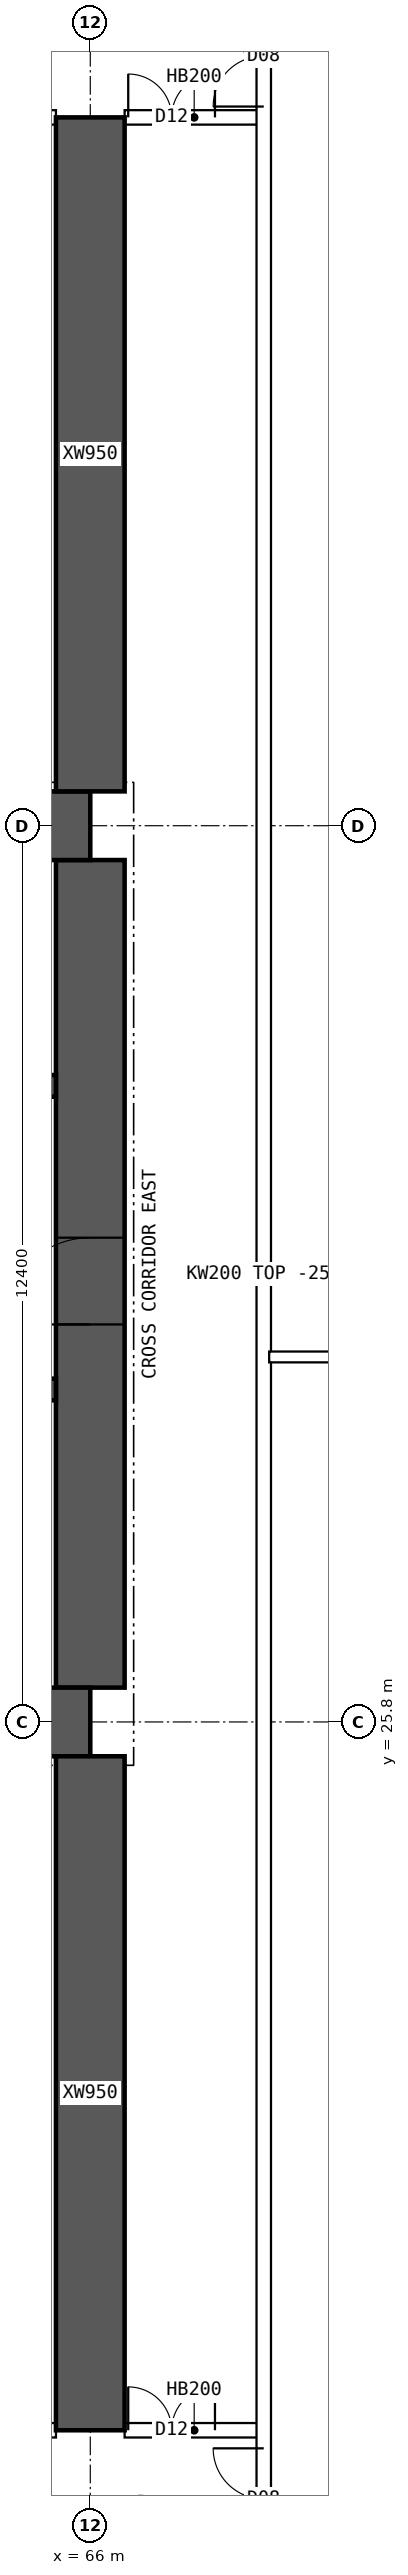
"""IFC4 building model, lengths in metres.
Left out: names, types, materials, properties, quantities, classifications, styles, units other than length and angle.
Written with IfcOpenShell. Run it as: python <this file> out.ifc"""

import sys

from ifc_helpers import new_model, si_unit, direction, frame, frame_2d, origin, place, context, subcontext, project, spatial, polyline, rectangle, outline, extrude, element, fill, save


model = new_model("IFC4")
c1 = context("Model", 3, precision=1e-05, world=origin(), true_north=direction((0.0, 1.0)))
c2 = subcontext(c1, "Body", "Model", "MODEL_VIEW")
j1 = project(units=[si_unit("LENGTHUNIT", "METRE"), si_unit("PLANEANGLEUNIT", "RADIAN")], contexts=[c1])
p1 = place(None, origin())
s1 = spatial("IfcSite", under=j1, at=p1, CompositionType="ELEMENT")
p2 = place(p1, origin())
s2 = spatial("IfcBuilding", under=s1, at=p2, CompositionType="ELEMENT")
p3 = place(p2, frame((0.0, 0.0, 125.65)))
s3 = spatial("IfcBuildingStorey", under=s2, at=p3, CompositionType="ELEMENT", Elevation=125.65)
for number, where, z_axis, x_axis in (
    (1, (18.0, 25.8, 0.0), (0.0, 0.0, 1.0), (1.0, 0.0, 0.0)),
    (2, (18.0, 38.2, 0.0), (0.0, 0.0, 1.0), (1.0, 0.0, 0.0)),
):
    element("IfcWall", number, at=place(p3, frame(where, z_axis=z_axis, x_axis=x_axis)), inside=s3, PredefinedType="SHEAR", context=c2, shape_type="SweptSolid", body=[
        extrude(rectangle(XDim=48.0, YDim=0.95, at=frame_2d((24.0, 0.0))), origin(), (0.0, 0.0, 1.0), 3.75),
    ])
p4 = place(p3, frame((66.0, 26.275, 0.0), z_axis=(0.0, 0.0, 1.0), x_axis=(0.0, 1.0, 0.0)))
e3 = element("IfcWall", 3, at=p4, inside=s3, PredefinedType="SHEAR", context=c2, shape_type="SweptSolid", body=[
    extrude(rectangle(XDim=11.45, YDim=0.95, at=frame_2d((5.725, 0.0))), origin(), (0.0, 0.0, 1.0), 3.75),
])
p5 = place(p4, frame((5.025, 0.0, 0.0)))
e4 = element("IfcOpeningElement", 4, at=p5, cuts=e3, PredefinedType="OPENING", context=c2, shape_type="SweptSolid", body=[
    extrude(rectangle(XDim=1.2, YDim=2.1, at=frame_2d((0.6, 1.05))), frame((0.0, 0.485, 0.0), z_axis=(0.0, -1.0, 0.0), x_axis=(1.0, 0.0, 0.0)), (0.0, 0.0, 1.0), 0.97),
])
p6 = place(p3, frame((18.475, 30.4, 0.0), z_axis=(0.0, 0.0, 1.0), x_axis=(1.0, 0.0, 0.0)))
e5 = element("IfcWall", 5, at=p6, inside=s3, PredefinedType="SHEAR", context=c2, shape_type="SweptSolid", body=[
    extrude(rectangle(XDim=47.05, YDim=0.3, at=frame_2d((23.525, 0.0))), origin(), (0.0, 0.0, 1.0), 3.75),
])
p7 = place(p6, frame((0.4, 0.0, 0.0)))
e6 = element("IfcOpeningElement", 6, at=p7, cuts=e5, PredefinedType="OPENING", context=c2, shape_type="SweptSolid", body=[
    extrude(rectangle(XDim=1.0, YDim=2.1, at=frame_2d((0.5, 1.05))), frame((0.0, 0.16, 0.0), z_axis=(0.0, -1.0, 0.0), x_axis=(1.0, 0.0, 0.0)), (0.0, 0.0, 1.0), 0.32),
])
p8 = place(p6, frame((45.65, 0.0, 0.0)))
e7 = element("IfcOpeningElement", 7, at=p8, cuts=e5, PredefinedType="OPENING", context=c2, shape_type="SweptSolid", body=[
    extrude(rectangle(XDim=1.0, YDim=2.1, at=frame_2d((0.5, 1.05))), frame((0.0, 0.16, 0.0), z_axis=(0.0, -1.0, 0.0), x_axis=(1.0, 0.0, 0.0)), (0.0, 0.0, 1.0), 0.32),
])
p9 = place(p6, frame((8.275, 0.0, 0.0)))
e8 = element("IfcOpeningElement", 8, at=p9, cuts=e5, PredefinedType="OPENING", context=c2, shape_type="SweptSolid", body=[
    extrude(rectangle(XDim=1.1, YDim=2.1, at=frame_2d((0.55, 1.05))), frame((0.0, 0.16, 0.0), z_axis=(0.0, -1.0, 0.0), x_axis=(1.0, 0.0, 0.0)), (0.0, 0.0, 1.0), 0.32),
])
p10 = place(p6, frame((10.875, 0.0, 0.0)))
e9 = element("IfcOpeningElement", 9, at=p10, cuts=e5, PredefinedType="OPENING", context=c2, shape_type="SweptSolid", body=[
    extrude(rectangle(XDim=1.1, YDim=2.1, at=frame_2d((0.55, 1.05))), frame((0.0, 0.16, 0.0), z_axis=(0.0, -1.0, 0.0), x_axis=(1.0, 0.0, 0.0)), (0.0, 0.0, 1.0), 0.32),
])
p11 = place(p6, frame((13.475, 0.0, 0.0)))
e10 = element("IfcOpeningElement", 10, at=p11, cuts=e5, PredefinedType="OPENING", context=c2, shape_type="SweptSolid", body=[
    extrude(rectangle(XDim=1.1, YDim=2.1, at=frame_2d((0.55, 1.05))), frame((0.0, 0.16, 0.0), z_axis=(0.0, -1.0, 0.0), x_axis=(1.0, 0.0, 0.0)), (0.0, 0.0, 1.0), 0.32),
])
p12 = place(p6, frame((16.075, 0.0, 0.0)))
e11 = element("IfcOpeningElement", 11, at=p12, cuts=e5, PredefinedType="OPENING", context=c2, shape_type="SweptSolid", body=[
    extrude(rectangle(XDim=1.1, YDim=2.1, at=frame_2d((0.55, 1.05))), frame((0.0, 0.16, 0.0), z_axis=(0.0, -1.0, 0.0), x_axis=(1.0, 0.0, 0.0)), (0.0, 0.0, 1.0), 0.32),
])
p13 = place(p6, frame((18.85, 0.0, 0.0)))
e12 = element("IfcOpeningElement", 12, at=p13, cuts=e5, PredefinedType="OPENING", context=c2, shape_type="SweptSolid", body=[
    extrude(rectangle(XDim=0.9, YDim=2.1, at=frame_2d((0.45, 1.05))), frame((0.0, 0.16, 0.0), z_axis=(0.0, -1.0, 0.0), x_axis=(1.0, 0.0, 0.0)), (0.0, 0.0, 1.0), 0.32),
])
p14 = place(p6, frame((30.142, 0.0, 0.0)))
e13 = element("IfcOpeningElement", 13, at=p14, cuts=e5, PredefinedType="OPENING", context=c2, shape_type="SweptSolid", body=[
    extrude(rectangle(XDim=1.1, YDim=2.1, at=frame_2d((0.55, 1.05))), frame((0.0, 0.16, 0.0), z_axis=(0.0, -1.0, 0.0), x_axis=(1.0, 0.0, 0.0)), (0.0, 0.0, 1.0), 0.32),
])
p15 = place(p6, frame((33.675, 0.0, 0.0)))
e14 = element("IfcOpeningElement", 14, at=p15, cuts=e5, PredefinedType="OPENING", context=c2, shape_type="SweptSolid", body=[
    extrude(rectangle(XDim=1.1, YDim=2.1, at=frame_2d((0.55, 1.05))), frame((0.0, 0.16, 0.0), z_axis=(0.0, -1.0, 0.0), x_axis=(1.0, 0.0, 0.0)), (0.0, 0.0, 1.0), 0.32),
])
p16 = place(p6, frame((37.208, 0.0, 0.0)))
e15 = element("IfcOpeningElement", 15, at=p16, cuts=e5, PredefinedType="OPENING", context=c2, shape_type="SweptSolid", body=[
    extrude(rectangle(XDim=1.1, YDim=2.1, at=frame_2d((0.55, 1.05))), frame((0.0, 0.16, 0.0), z_axis=(0.0, -1.0, 0.0), x_axis=(1.0, 0.0, 0.0)), (0.0, 0.0, 1.0), 0.32),
])
p17 = place(p3, frame((18.475, 34.6, 0.0), z_axis=(0.0, 0.0, 1.0), x_axis=(1.0, 0.0, 0.0)))
e16 = element("IfcWall", 16, at=p17, inside=s3, PredefinedType="SHEAR", context=c2, shape_type="SweptSolid", body=[
    extrude(rectangle(XDim=47.05, YDim=0.3, at=frame_2d((23.525, 0.0))), origin(), (0.0, 0.0, 1.0), 3.75),
])
p18 = place(p17, frame((0.9, 0.0, 0.0)))
e17 = element("IfcOpeningElement", 17, at=p18, cuts=e16, PredefinedType="OPENING", context=c2, shape_type="SweptSolid", body=[
    extrude(rectangle(XDim=1.1, YDim=2.1, at=frame_2d((0.55, 1.05))), frame((0.0, 0.16, 0.0), z_axis=(0.0, -1.0, 0.0), x_axis=(1.0, 0.0, 0.0)), (0.0, 0.0, 1.0), 0.32),
])
p19 = place(p17, frame((45.05, 0.0, 0.0)))
e18 = element("IfcOpeningElement", 18, at=p19, cuts=e16, PredefinedType="OPENING", context=c2, shape_type="SweptSolid", body=[
    extrude(rectangle(XDim=1.1, YDim=2.1, at=frame_2d((0.55, 1.05))), frame((0.0, 0.16, 0.0), z_axis=(0.0, -1.0, 0.0), x_axis=(1.0, 0.0, 0.0)), (0.0, 0.0, 1.0), 0.32),
])
p20 = place(p17, frame((4.125, 0.0, 0.0)))
e19 = element("IfcOpeningElement", 19, at=p20, cuts=e16, PredefinedType="OPENING", context=c2, shape_type="SweptSolid", body=[
    extrude(rectangle(XDim=0.9, YDim=2.1, at=frame_2d((0.45, 1.05))), frame((0.0, 0.16, 0.0), z_axis=(0.0, -1.0, 0.0), x_axis=(1.0, 0.0, 0.0)), (0.0, 0.0, 1.0), 0.32),
])
p21 = place(p17, frame((42.025, 0.0, 0.0)))
e20 = element("IfcOpeningElement", 20, at=p21, cuts=e16, PredefinedType="OPENING", context=c2, shape_type="SweptSolid", body=[
    extrude(rectangle(XDim=0.9, YDim=2.1, at=frame_2d((0.45, 1.05))), frame((0.0, 0.16, 0.0), z_axis=(0.0, -1.0, 0.0), x_axis=(1.0, 0.0, 0.0)), (0.0, 0.0, 1.0), 0.32),
])
p22 = place(p17, frame((8.9, 0.0, 0.0)))
e21 = element("IfcOpeningElement", 21, at=p22, cuts=e16, PredefinedType="OPENING", context=c2, shape_type="SweptSolid", body=[
    extrude(rectangle(XDim=0.9, YDim=2.1, at=frame_2d((0.45, 1.05))), frame((0.0, 0.16, 0.0), z_axis=(0.0, -1.0, 0.0), x_axis=(1.0, 0.0, 0.0)), (0.0, 0.0, 1.0), 0.32),
])
p23 = place(p17, frame((12.874, 0.0, 0.0)))
e22 = element("IfcOpeningElement", 22, at=p23, cuts=e16, PredefinedType="OPENING", context=c2, shape_type="SweptSolid", body=[
    extrude(rectangle(XDim=0.9, YDim=2.1, at=frame_2d((0.45, 1.05))), frame((0.0, 0.16, 0.0), z_axis=(0.0, -1.0, 0.0), x_axis=(1.0, 0.0, 0.0)), (0.0, 0.0, 1.0), 0.32),
])
p24 = place(p17, frame((16.521, 0.0, 0.0)))
e23 = element("IfcOpeningElement", 23, at=p24, cuts=e16, PredefinedType="OPENING", context=c2, shape_type="SweptSolid", body=[
    extrude(rectangle(XDim=0.9, YDim=2.1, at=frame_2d((0.45, 1.05))), frame((0.0, 0.16, 0.0), z_axis=(0.0, -1.0, 0.0), x_axis=(1.0, 0.0, 0.0)), (0.0, 0.0, 1.0), 0.32),
])
p25 = place(p17, frame((20.28, 0.0, 0.0)))
e24 = element("IfcOpeningElement", 24, at=p25, cuts=e16, PredefinedType="OPENING", context=c2, shape_type="SweptSolid", body=[
    extrude(rectangle(XDim=0.9, YDim=2.1, at=frame_2d((0.45, 1.05))), frame((0.0, 0.16, 0.0), z_axis=(0.0, -1.0, 0.0), x_axis=(1.0, 0.0, 0.0)), (0.0, 0.0, 1.0), 0.32),
])
p26 = place(p17, frame((24.686, 0.0, 0.0)))
e25 = element("IfcOpeningElement", 25, at=p26, cuts=e16, PredefinedType="OPENING", context=c2, shape_type="SweptSolid", body=[
    extrude(rectangle(XDim=0.9, YDim=2.1, at=frame_2d((0.45, 1.05))), frame((0.0, 0.16, 0.0), z_axis=(0.0, -1.0, 0.0), x_axis=(1.0, 0.0, 0.0)), (0.0, 0.0, 1.0), 0.32),
])
p27 = place(p17, frame((27.483, 0.0, 0.0)))
e26 = element("IfcOpeningElement", 26, at=p27, cuts=e16, PredefinedType="OPENING", context=c2, shape_type="SweptSolid", body=[
    extrude(rectangle(XDim=0.9, YDim=2.1, at=frame_2d((0.45, 1.05))), frame((0.0, 0.16, 0.0), z_axis=(0.0, -1.0, 0.0), x_axis=(1.0, 0.0, 0.0)), (0.0, 0.0, 1.0), 0.32),
])
p28 = place(p17, frame((29.45, 0.0, 0.0)))
e27 = element("IfcOpeningElement", 27, at=p28, cuts=e16, PredefinedType="OPENING", context=c2, shape_type="SweptSolid", body=[
    extrude(rectangle(XDim=0.9, YDim=2.1, at=frame_2d((0.45, 1.05))), frame((0.0, 0.16, 0.0), z_axis=(0.0, -1.0, 0.0), x_axis=(1.0, 0.0, 0.0)), (0.0, 0.0, 1.0), 0.32),
])
p29 = place(p17, frame((31.882, 0.0, 0.0)))
e28 = element("IfcOpeningElement", 28, at=p29, cuts=e16, PredefinedType="OPENING", context=c2, shape_type="SweptSolid", body=[
    extrude(rectangle(XDim=0.9, YDim=2.1, at=frame_2d((0.45, 1.05))), frame((0.0, 0.16, 0.0), z_axis=(0.0, -1.0, 0.0), x_axis=(1.0, 0.0, 0.0)), (0.0, 0.0, 1.0), 0.32),
])
p30 = place(p17, frame((34.617, 0.0, 0.0)))
e29 = element("IfcOpeningElement", 29, at=p30, cuts=e16, PredefinedType="OPENING", context=c2, shape_type="SweptSolid", body=[
    extrude(rectangle(XDim=0.9, YDim=2.1, at=frame_2d((0.45, 1.05))), frame((0.0, 0.16, 0.0), z_axis=(0.0, -1.0, 0.0), x_axis=(1.0, 0.0, 0.0)), (0.0, 0.0, 1.0), 0.32),
])
p31 = place(p17, frame((37.656, 0.0, 0.0)))
e30 = element("IfcOpeningElement", 30, at=p31, cuts=e16, PredefinedType="OPENING", context=c2, shape_type="SweptSolid", body=[
    extrude(rectangle(XDim=0.9, YDim=2.1, at=frame_2d((0.45, 1.05))), frame((0.0, 0.16, 0.0), z_axis=(0.0, -1.0, 0.0), x_axis=(1.0, 0.0, 0.0)), (0.0, 0.0, 1.0), 0.32),
])
for number, where, z_axis, x_axis in (
    (31, (66.0, 16.0, 0.0), (0.0, 0.0, 1.0), (0.0, 1.0, 0.0)),
    (32, (66.0, 38.675, 0.0), (0.0, 0.0, 1.0), (0.0, 1.0, 0.0)),
):
    element("IfcWall", number, at=place(p3, frame(where, z_axis=z_axis, x_axis=x_axis)), inside=s3, PredefinedType="SHEAR", context=c2, shape_type="SweptSolid", body=[
        extrude(rectangle(XDim=9.325, YDim=0.95, at=frame_2d((4.663, 0.0))), origin(), (0.0, 0.0, 1.0), 3.75),
    ])
p32 = place(p3, frame((60.475, 16.0, 0.0), z_axis=(0.0, 0.0, 1.0), x_axis=(1.0, 0.0, 0.0)))
e33 = element("IfcWall", 33, at=p32, inside=s3, PredefinedType="SOLIDWALL", context=c2, shape_type="SweptSolid", body=[
    extrude(rectangle(XDim=5.05, YDim=0.2, at=frame_2d((2.525, 0.0))), origin(), (0.0, 0.0, 1.0), 3.5),
])
p33 = place(p32, frame((0.15, 0.0, 0.0)))
e34 = element("IfcOpeningElement", 34, at=p33, cuts=e33, PredefinedType="OPENING", context=c2, shape_type="SweptSolid", body=[
    extrude(rectangle(XDim=0.9, YDim=2.1, at=frame_2d((0.45, 1.05))), frame((0.0, 0.11, 0.0), z_axis=(0.0, -1.0, 0.0), x_axis=(1.0, 0.0, 0.0)), (0.0, 0.0, 1.0), 0.22),
])
p34 = place(p32, frame((3.535, 0.0, 0.0)))
e35 = element("IfcOpeningElement", 35, at=p34, cuts=e33, PredefinedType="OPENING", context=c2, shape_type="SweptSolid", body=[
    extrude(rectangle(XDim=0.9, YDim=2.1, at=frame_2d((0.45, 1.05))), frame((0.0, 0.11, 0.0), z_axis=(0.0, -1.0, 0.0), x_axis=(1.0, 0.0, 0.0)), (0.0, 0.0, 1.0), 0.22),
])
p35 = place(p3, frame((66.475, 16.0, 0.0), z_axis=(0.0, 0.0, 1.0), x_axis=(1.0, 0.0, 0.0)))
e36 = element("IfcWall", 36, at=p35, inside=s3, PredefinedType="SOLIDWALL", context=c2, shape_type="SweptSolid", body=[
    extrude(rectangle(XDim=1.925, YDim=0.2, at=frame_2d((0.962, 0.0))), origin(), (0.0, 0.0, 1.0), 3.5),
])
p36 = place(p35, frame((0.05, 0.0, 0.0)))
e37 = element("IfcOpeningElement", 37, at=p36, cuts=e36, PredefinedType="OPENING", context=c2, shape_type="SweptSolid", body=[
    extrude(rectangle(XDim=1.2, YDim=2.1, at=frame_2d((0.6, 1.05))), frame((0.0, 0.11, 0.0), z_axis=(0.0, -1.0, 0.0), x_axis=(1.0, 0.0, 0.0)), (0.0, 0.0, 1.0), 0.22),
])
p37 = place(p3, frame((60.475, 48.0, 0.0), z_axis=(0.0, 0.0, 1.0), x_axis=(1.0, 0.0, 0.0)))
e38 = element("IfcWall", 38, at=p37, inside=s3, PredefinedType="SOLIDWALL", context=c2, shape_type="SweptSolid", body=[
    extrude(rectangle(XDim=5.05, YDim=0.2, at=frame_2d((2.525, 0.0))), origin(), (0.0, 0.0, 1.0), 3.5),
])
p38 = place(p37, frame((0.4, 0.0, 0.0)))
e39 = element("IfcOpeningElement", 39, at=p38, cuts=e38, PredefinedType="OPENING", context=c2, shape_type="SweptSolid", body=[
    extrude(rectangle(XDim=1.0, YDim=2.1, at=frame_2d((0.5, 1.05))), frame((0.0, 0.11, 0.0), z_axis=(0.0, -1.0, 0.0), x_axis=(1.0, 0.0, 0.0)), (0.0, 0.0, 1.0), 0.22),
])
p39 = place(p3, frame((66.475, 48.0, 0.0), z_axis=(0.0, 0.0, 1.0), x_axis=(1.0, 0.0, 0.0)))
e40 = element("IfcWall", 40, at=p39, inside=s3, PredefinedType="SOLIDWALL", context=c2, shape_type="SweptSolid", body=[
    extrude(rectangle(XDim=1.925, YDim=0.2, at=frame_2d((0.962, 0.0))), origin(), (0.0, 0.0, 1.0), 3.5),
])
p40 = place(p39, frame((0.05, 0.0, 0.0)))
e41 = element("IfcOpeningElement", 41, at=p40, cuts=e40, PredefinedType="OPENING", context=c2, shape_type="SweptSolid", body=[
    extrude(rectangle(XDim=1.2, YDim=2.1, at=frame_2d((0.6, 1.05))), frame((0.0, 0.11, 0.0), z_axis=(0.0, -1.0, 0.0), x_axis=(1.0, 0.0, 0.0)), (0.0, 0.0, 1.0), 0.22),
])
p41 = place(p3, frame((68.475, 30.85, 0.0), z_axis=(0.0, 0.0, 1.0), x_axis=(1.0, 0.0, 0.0)))
e42 = element("IfcWall", 42, at=p41, inside=s3, PredefinedType="PARTITIONING", context=c2, shape_type="SweptSolid", body=[
    extrude(outline(polyline([(0.0, 0.0), (6.82, 0.0), (6.82, 3.5), (3.827, 3.5), (3.825, 3.05), (3.227, 3.05), (3.225, 3.5), (0.0, 3.5), (0.0, 0.0)])), frame((0.0, 0.075, 0.0), z_axis=(0.0, -1.0, 0.0), x_axis=(1.0, 0.0, 0.0)), (0.0, 0.0, 1.0), 0.15),
])
p42 = place(p3, frame((68.4, 9.405, 0.0), z_axis=(0.0, 0.0, 1.0), x_axis=(0.0, 1.0, 0.0)))
e43 = element("IfcWall", 43, at=p42, inside=s3, PredefinedType="SOLIDWALL", context=c2, shape_type="SweptSolid", body=[
    extrude(rectangle(XDim=45.189, YDim=0.2, at=frame_2d((22.595, 0.0))), origin(), (0.0, 0.0, 1.0), 3.5),
])
p43 = place(p42, frame((4.945, 0.0, 0.0)))
e44 = element("IfcOpeningElement", 44, at=p43, cuts=e43, PredefinedType="OPENING", context=c2, shape_type="SweptSolid", body=[
    extrude(rectangle(XDim=1.4, YDim=2.1, at=frame_2d((0.7, 1.05))), frame((0.0, 0.11, 0.0), z_axis=(0.0, -1.0, 0.0), x_axis=(1.0, 0.0, 0.0)), (0.0, 0.0, 1.0), 0.22),
])
p44 = place(p42, frame((38.745, 0.0, 0.0)))
e45 = element("IfcOpeningElement", 45, at=p44, cuts=e43, PredefinedType="OPENING", context=c2, shape_type="SweptSolid", body=[
    extrude(rectangle(XDim=1.4, YDim=2.1, at=frame_2d((0.7, 1.05))), frame((0.0, 0.11, 0.0), z_axis=(0.0, -1.0, 0.0), x_axis=(1.0, 0.0, 0.0)), (0.0, 0.0, 1.0), 0.22),
])
p45 = place(p5, origin())
e46 = element("IfcDoor", 46, at=p45, inside=s3, OperationType="SINGLE_SWING_LEFT", PredefinedType="DOOR", context=c2, shape_type="SweptSolid", body=[
    extrude(rectangle(XDim=1.2, YDim=2.1, at=frame_2d((0.6, 1.05))), frame((0.0, 0.025, 0.0), z_axis=(0.0, -1.0, 0.0), x_axis=(1.0, 0.0, 0.0)), (0.0, 0.0, 1.0), 0.05),
])
fill(e4, e46)
p46 = place(p36, origin())
e47 = element("IfcDoor", 47, at=p46, inside=s3, OperationType="DOUBLE_DOOR_SINGLE_SWING", PredefinedType="DOOR", context=c2, shape_type="SweptSolid", body=[
    extrude(rectangle(XDim=1.2, YDim=2.1, at=frame_2d((0.6, 1.05))), frame((0.0, 0.025, 0.0), z_axis=(0.0, -1.0, 0.0), x_axis=(1.0, 0.0, 0.0)), (0.0, 0.0, 1.0), 0.05),
])
fill(e37, e47)
p47 = place(p40, origin())
e48 = element("IfcDoor", 48, at=p47, inside=s3, OperationType="DOUBLE_DOOR_SINGLE_SWING", PredefinedType="DOOR", context=c2, shape_type="SweptSolid", body=[
    extrude(rectangle(XDim=1.2, YDim=2.1, at=frame_2d((0.6, 1.05))), frame((0.0, 0.025, 0.0), z_axis=(0.0, -1.0, 0.0), x_axis=(1.0, 0.0, 0.0)), (0.0, 0.0, 1.0), 0.05),
])
fill(e41, e48)
p48 = place(p43, origin())
e49 = element("IfcDoor", 49, at=p48, inside=s3, OperationType="DOUBLE_DOOR_SINGLE_SWING", PredefinedType="DOOR", context=c2, shape_type="SweptSolid", body=[
    extrude(rectangle(XDim=1.4, YDim=2.1, at=frame_2d((0.7, 1.05))), frame((0.0, 0.025, 0.0), z_axis=(0.0, -1.0, 0.0), x_axis=(1.0, 0.0, 0.0)), (0.0, 0.0, 1.0), 0.05),
])
fill(e44, e49)
p49 = place(p44, origin())
e50 = element("IfcDoor", 50, at=p49, inside=s3, OperationType="DOUBLE_DOOR_SINGLE_SWING", PredefinedType="DOOR", context=c2, shape_type="SweptSolid", body=[
    extrude(rectangle(XDim=1.4, YDim=2.1, at=frame_2d((0.7, 1.05))), frame((0.0, 0.025, 0.0), z_axis=(0.0, -1.0, 0.0), x_axis=(1.0, 0.0, 0.0)), (0.0, 0.0, 1.0), 0.05),
])
fill(e45, e50)
save(model, sys.argv[1])
